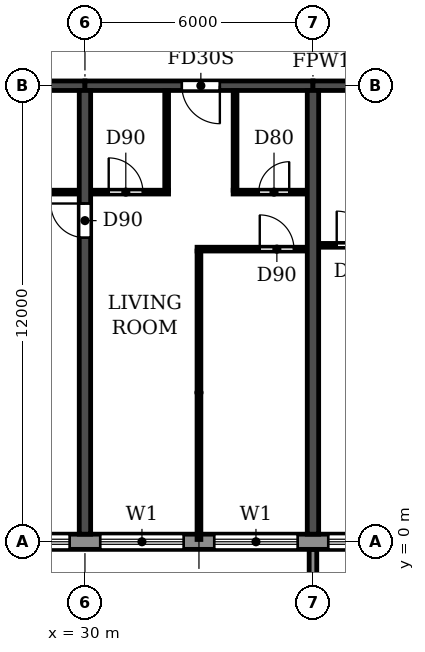
"""IFC4 building model, lengths in metres.
Left out: names, types, materials, properties, quantities, classifications, styles, units other than length and angle.
Written with IfcOpenShell. Run it as: python <this file> out.ifc"""

import sys

from ifc_helpers import new_model, si_unit, direction, frame, frame_2d, origin, place, context, subcontext, project, spatial, polyline, rectangle, outline, extrude, source, transform, mapped, element, fill, save


model = new_model("IFC4")
c1 = context("Model", 3, precision=1e-05, world=origin(), true_north=direction((0.0, 1.0)))
c2 = subcontext(c1, "Body", "Model", "MODEL_VIEW")
j1 = project(units=[si_unit("LENGTHUNIT", "METRE"), si_unit("PLANEANGLEUNIT", "RADIAN")], contexts=[c1])
p1 = place(None, origin())
s1 = spatial("IfcSite", under=j1, at=p1, CompositionType="ELEMENT")
p2 = place(p1, origin())
s2 = spatial("IfcBuilding", under=s1, at=p2, CompositionType="ELEMENT")
p3 = place(p2, frame((0.0, 0.0, 125.7)))
s3 = spatial("IfcBuildingStorey", under=s2, at=p3, CompositionType="ELEMENT", Elevation=125.7)
p4 = place(p3, frame((30.0, 0.2, 0.0), z_axis=(0.0, 0.0, 1.0), x_axis=(0.0, 1.0, 0.0)))
e1 = element("IfcWall", 1, at=p4, inside=s3, PredefinedType="SHEAR", context=c2, shape_type="SweptSolid", body=[
    extrude(rectangle(XDim=11.675, YDim=0.3, at=frame_2d((5.837, 0.0))), origin(), (0.0, 0.0, 1.0), 3.07),
])
p5 = place(p4, frame((7.8, 0.0, 0.0)))
e2 = element("IfcOpeningElement", 2, at=p5, cuts=e1, PredefinedType="OPENING", context=c2, shape_type="SweptSolid", body=[
    extrude(rectangle(XDim=0.9, YDim=2.1, at=frame_2d((0.45, 1.05))), frame((0.0, 0.16, 0.0), z_axis=(0.0, -1.0, 0.0), x_axis=(1.0, 0.0, 0.0)), (0.0, 0.0, 1.0), 0.32),
])
p6 = place(p3, frame((36.0, 0.2, 0.0), z_axis=(0.0, 0.0, 1.0), x_axis=(0.0, 1.0, 0.0)))
e3 = element("IfcWall", 3, at=p6, inside=s3, PredefinedType="SHEAR", context=c2, shape_type="SweptSolid", body=[
    extrude(rectangle(XDim=11.675, YDim=0.3, at=frame_2d((5.837, 0.0))), origin(), (0.0, 0.0, 1.0), 3.07),
])
p7 = place(p3, frame((24.0, 12.0, 0.0), z_axis=(0.0, 0.0, 1.0), x_axis=(1.0, 0.0, 0.0)))
e4 = element("IfcWall", 4, at=p7, inside=s3, PredefinedType="SHEAR", context=c2, shape_type="SweptSolid", body=[
    extrude(rectangle(XDim=6.0, YDim=0.25, at=frame_2d((3.0, 0.0))), origin(), (0.0, 0.0, 1.0), 2.47),
])
p8 = place(p3, frame((30.0, 12.0, 0.0), z_axis=(0.0, 0.0, 1.0), x_axis=(1.0, 0.0, 0.0)))
e5 = element("IfcWall", 5, at=p8, inside=s3, PredefinedType="SHEAR", context=c2, shape_type="SweptSolid", body=[
    extrude(rectangle(XDim=6.0, YDim=0.25, at=frame_2d((3.0, 0.0))), origin(), (0.0, 0.0, 1.0), 2.47),
])
p9 = place(p8, frame((2.55, 0.0, 0.0)))
e6 = element("IfcOpeningElement", 6, at=p9, cuts=e5, PredefinedType="OPENING", context=c2, shape_type="SweptSolid", body=[
    extrude(rectangle(XDim=1.0, YDim=2.1, at=frame_2d((0.5, 1.05))), frame((0.0, 0.135, 0.0), z_axis=(0.0, -1.0, 0.0), x_axis=(1.0, 0.0, 0.0)), (0.0, 0.0, 1.0), 0.27),
])
p10 = place(p3, frame((36.0, 12.0, 0.0), z_axis=(0.0, 0.0, 1.0), x_axis=(1.0, 0.0, 0.0)))
e7 = element("IfcWall", 7, at=p10, inside=s3, PredefinedType="SHEAR", context=c2, shape_type="SweptSolid", body=[
    extrude(rectangle(XDim=6.0, YDim=0.25, at=frame_2d((3.0, 0.0))), origin(), (0.0, 0.0, 1.0), 2.47),
])
p11 = place(p10, frame((2.55, 0.0, 0.0)))
e8 = element("IfcOpeningElement", 8, at=p11, cuts=e7, PredefinedType="OPENING", context=c2, shape_type="SweptSolid", body=[
    extrude(rectangle(XDim=1.0, YDim=2.1, at=frame_2d((0.5, 1.05))), frame((0.0, 0.135, 0.0), z_axis=(0.0, -1.0, 0.0), x_axis=(1.0, 0.0, 0.0)), (0.0, 0.0, 1.0), 0.27),
])
p12 = place(p3, frame((16.683, 0.0, 0.0), z_axis=(0.0, 0.0, 1.0), x_axis=(1.0, 0.0, 0.0)))
e9 = element("IfcWall", 9, at=p12, inside=s3, PredefinedType="STANDARD", context=c2, shape_type="SweptSolid", body=[
    extrude(rectangle(XDim=68.634, YDim=0.4, at=frame_2d((34.317, 0.0))), origin(), (0.0, 0.0, 1.0), 3.07),
])
p13 = place(p12, frame((1.717, 0.0, 0.9)))
e10 = element("IfcOpeningElement", 10, at=p13, cuts=e9, PredefinedType="OPENING", context=c2, shape_type="SweptSolid", body=[
    extrude(rectangle(XDim=2.2, YDim=1.5, at=frame_2d((1.1, 0.75))), frame((0.0, 0.21, 0.0), z_axis=(0.0, -1.0, 0.0), x_axis=(1.0, 0.0, 0.0)), (0.0, 0.0, 1.0), 0.42),
])
p14 = place(p12, frame((4.717, 0.0, 0.9)))
e11 = element("IfcOpeningElement", 11, at=p14, cuts=e9, PredefinedType="OPENING", context=c2, shape_type="SweptSolid", body=[
    extrude(rectangle(XDim=2.2, YDim=1.5, at=frame_2d((1.1, 0.75))), frame((0.0, 0.21, 0.0), z_axis=(0.0, -1.0, 0.0), x_axis=(1.0, 0.0, 0.0)), (0.0, 0.0, 1.0), 0.42),
])
p15 = place(p12, frame((7.717, 0.0, 0.9)))
e12 = element("IfcOpeningElement", 12, at=p15, cuts=e9, PredefinedType="OPENING", context=c2, shape_type="SweptSolid", body=[
    extrude(rectangle(XDim=2.2, YDim=1.5, at=frame_2d((1.1, 0.75))), frame((0.0, 0.21, 0.0), z_axis=(0.0, -1.0, 0.0), x_axis=(1.0, 0.0, 0.0)), (0.0, 0.0, 1.0), 0.42),
])
p16 = place(p12, frame((10.717, 0.0, 0.9)))
e13 = element("IfcOpeningElement", 13, at=p16, cuts=e9, PredefinedType="OPENING", context=c2, shape_type="SweptSolid", body=[
    extrude(rectangle(XDim=2.2, YDim=1.5, at=frame_2d((1.1, 0.75))), frame((0.0, 0.21, 0.0), z_axis=(0.0, -1.0, 0.0), x_axis=(1.0, 0.0, 0.0)), (0.0, 0.0, 1.0), 0.42),
])
p17 = place(p12, frame((13.717, 0.0, 0.9)))
e14 = element("IfcOpeningElement", 14, at=p17, cuts=e9, PredefinedType="OPENING", context=c2, shape_type="SweptSolid", body=[
    extrude(rectangle(XDim=2.2, YDim=1.5, at=frame_2d((1.1, 0.75))), frame((0.0, 0.21, 0.0), z_axis=(0.0, -1.0, 0.0), x_axis=(1.0, 0.0, 0.0)), (0.0, 0.0, 1.0), 0.42),
])
p18 = place(p12, frame((16.717, 0.0, 0.9)))
e15 = element("IfcOpeningElement", 15, at=p18, cuts=e9, PredefinedType="OPENING", context=c2, shape_type="SweptSolid", body=[
    extrude(rectangle(XDim=2.2, YDim=1.5, at=frame_2d((1.1, 0.75))), frame((0.0, 0.21, 0.0), z_axis=(0.0, -1.0, 0.0), x_axis=(1.0, 0.0, 0.0)), (0.0, 0.0, 1.0), 0.42),
])
p19 = place(p12, frame((19.717, 0.0, 0.9)))
e16 = element("IfcOpeningElement", 16, at=p19, cuts=e9, PredefinedType="OPENING", context=c2, shape_type="SweptSolid", body=[
    extrude(rectangle(XDim=2.2, YDim=1.5, at=frame_2d((1.1, 0.75))), frame((0.0, 0.21, 0.0), z_axis=(0.0, -1.0, 0.0), x_axis=(1.0, 0.0, 0.0)), (0.0, 0.0, 1.0), 0.42),
])
p20 = place(p12, frame((22.917, 0.0, 0.0)))
e17 = element("IfcOpeningElement", 17, at=p20, cuts=e9, PredefinedType="OPENING", context=c2, shape_type="SweptSolid", body=[
    extrude(rectangle(XDim=1.8, YDim=2.4, at=frame_2d((0.9, 1.2))), frame((0.0, 0.21, 0.0), z_axis=(0.0, -1.0, 0.0), x_axis=(1.0, 0.0, 0.0)), (0.0, 0.0, 1.0), 0.42),
])
p21 = place(p12, frame((25.717, 0.0, 0.9)))
e18 = element("IfcOpeningElement", 18, at=p21, cuts=e9, PredefinedType="OPENING", context=c2, shape_type="SweptSolid", body=[
    extrude(rectangle(XDim=2.2, YDim=1.5, at=frame_2d((1.1, 0.75))), frame((0.0, 0.21, 0.0), z_axis=(0.0, -1.0, 0.0), x_axis=(1.0, 0.0, 0.0)), (0.0, 0.0, 1.0), 0.42),
])
p22 = place(p12, frame((28.717, 0.0, 0.9)))
e19 = element("IfcOpeningElement", 19, at=p22, cuts=e9, PredefinedType="OPENING", context=c2, shape_type="SweptSolid", body=[
    extrude(rectangle(XDim=2.2, YDim=1.5, at=frame_2d((1.1, 0.75))), frame((0.0, 0.21, 0.0), z_axis=(0.0, -1.0, 0.0), x_axis=(1.0, 0.0, 0.0)), (0.0, 0.0, 1.0), 0.42),
])
p23 = place(p12, frame((31.717, 0.0, 0.9)))
e20 = element("IfcOpeningElement", 20, at=p23, cuts=e9, PredefinedType="OPENING", context=c2, shape_type="SweptSolid", body=[
    extrude(rectangle(XDim=2.2, YDim=1.5, at=frame_2d((1.1, 0.75))), frame((0.0, 0.21, 0.0), z_axis=(0.0, -1.0, 0.0), x_axis=(1.0, 0.0, 0.0)), (0.0, 0.0, 1.0), 0.42),
])
p24 = place(p12, frame((34.917, 0.0, 0.0)))
e21 = element("IfcOpeningElement", 21, at=p24, cuts=e9, PredefinedType="OPENING", context=c2, shape_type="SweptSolid", body=[
    extrude(rectangle(XDim=1.8, YDim=2.4, at=frame_2d((0.9, 1.2))), frame((0.0, 0.21, 0.0), z_axis=(0.0, -1.0, 0.0), x_axis=(1.0, 0.0, 0.0)), (0.0, 0.0, 1.0), 0.42),
])
p25 = place(p12, frame((37.717, 0.0, 0.9)))
e22 = element("IfcOpeningElement", 22, at=p25, cuts=e9, PredefinedType="OPENING", context=c2, shape_type="SweptSolid", body=[
    extrude(rectangle(XDim=2.2, YDim=1.5, at=frame_2d((1.1, 0.75))), frame((0.0, 0.21, 0.0), z_axis=(0.0, -1.0, 0.0), x_axis=(1.0, 0.0, 0.0)), (0.0, 0.0, 1.0), 0.42),
])
p26 = place(p12, frame((40.717, 0.0, 0.9)))
e23 = element("IfcOpeningElement", 23, at=p26, cuts=e9, PredefinedType="OPENING", context=c2, shape_type="SweptSolid", body=[
    extrude(rectangle(XDim=2.2, YDim=1.5, at=frame_2d((1.1, 0.75))), frame((0.0, 0.21, 0.0), z_axis=(0.0, -1.0, 0.0), x_axis=(1.0, 0.0, 0.0)), (0.0, 0.0, 1.0), 0.42),
])
p27 = place(p12, frame((43.717, 0.0, 0.9)))
e24 = element("IfcOpeningElement", 24, at=p27, cuts=e9, PredefinedType="OPENING", context=c2, shape_type="SweptSolid", body=[
    extrude(rectangle(XDim=2.2, YDim=1.5, at=frame_2d((1.1, 0.75))), frame((0.0, 0.21, 0.0), z_axis=(0.0, -1.0, 0.0), x_axis=(1.0, 0.0, 0.0)), (0.0, 0.0, 1.0), 0.42),
])
p28 = place(p12, frame((46.917, 0.0, 0.0)))
e25 = element("IfcOpeningElement", 25, at=p28, cuts=e9, PredefinedType="OPENING", context=c2, shape_type="SweptSolid", body=[
    extrude(rectangle(XDim=1.8, YDim=2.4, at=frame_2d((0.9, 1.2))), frame((0.0, 0.21, 0.0), z_axis=(0.0, -1.0, 0.0), x_axis=(1.0, 0.0, 0.0)), (0.0, 0.0, 1.0), 0.42),
])
p29 = place(p12, frame((49.717, 0.0, 0.9)))
e26 = element("IfcOpeningElement", 26, at=p29, cuts=e9, PredefinedType="OPENING", context=c2, shape_type="SweptSolid", body=[
    extrude(rectangle(XDim=2.2, YDim=1.5, at=frame_2d((1.1, 0.75))), frame((0.0, 0.21, 0.0), z_axis=(0.0, -1.0, 0.0), x_axis=(1.0, 0.0, 0.0)), (0.0, 0.0, 1.0), 0.42),
])
p30 = place(p12, frame((52.717, 0.0, 0.9)))
e27 = element("IfcOpeningElement", 27, at=p30, cuts=e9, PredefinedType="OPENING", context=c2, shape_type="SweptSolid", body=[
    extrude(rectangle(XDim=2.2, YDim=1.5, at=frame_2d((1.1, 0.75))), frame((0.0, 0.21, 0.0), z_axis=(0.0, -1.0, 0.0), x_axis=(1.0, 0.0, 0.0)), (0.0, 0.0, 1.0), 0.42),
])
p31 = place(p12, frame((55.717, 0.0, 0.9)))
e28 = element("IfcOpeningElement", 28, at=p31, cuts=e9, PredefinedType="OPENING", context=c2, shape_type="SweptSolid", body=[
    extrude(rectangle(XDim=2.2, YDim=1.5, at=frame_2d((1.1, 0.75))), frame((0.0, 0.21, 0.0), z_axis=(0.0, -1.0, 0.0), x_axis=(1.0, 0.0, 0.0)), (0.0, 0.0, 1.0), 0.42),
])
p32 = place(p12, frame((58.917, 0.0, 0.0)))
e29 = element("IfcOpeningElement", 29, at=p32, cuts=e9, PredefinedType="OPENING", context=c2, shape_type="SweptSolid", body=[
    extrude(rectangle(XDim=1.8, YDim=2.4, at=frame_2d((0.9, 1.2))), frame((0.0, 0.21, 0.0), z_axis=(0.0, -1.0, 0.0), x_axis=(1.0, 0.0, 0.0)), (0.0, 0.0, 1.0), 0.42),
])
p33 = place(p12, frame((61.717, 0.0, 0.9)))
e30 = element("IfcOpeningElement", 30, at=p33, cuts=e9, PredefinedType="OPENING", context=c2, shape_type="SweptSolid", body=[
    extrude(rectangle(XDim=2.2, YDim=1.5, at=frame_2d((1.1, 0.75))), frame((0.0, 0.21, 0.0), z_axis=(0.0, -1.0, 0.0), x_axis=(1.0, 0.0, 0.0)), (0.0, 0.0, 1.0), 0.42),
])
p34 = place(p12, frame((64.717, 0.0, 0.9)))
e31 = element("IfcOpeningElement", 31, at=p34, cuts=e9, PredefinedType="OPENING", context=c2, shape_type="SweptSolid", body=[
    extrude(rectangle(XDim=2.2, YDim=1.5, at=frame_2d((1.1, 0.75))), frame((0.0, 0.21, 0.0), z_axis=(0.0, -1.0, 0.0), x_axis=(1.0, 0.0, 0.0)), (0.0, 0.0, 1.0), 0.42),
])
m1 = source(origin(), c2, "Body", "SweptSolid", [
    extrude(outline(polyline([(0.0, 0.0), (0.2, 0.0), (0.2, 1.65), (0.0, 1.65), (0.0, 0.0)])), origin(), (0.0, 0.0, 1.0), 3.1),
])
p35 = place(p3, frame((35.9, -1.85, 0.0)))
e32 = element("IfcWall", 32, at=p35, inside=s3, PredefinedType="STANDARD", context=c2, shape_type="MappedRepresentation", body=[
    mapped(m1, transform((0.0, 0.0, 0.0))),
])
p36 = place(p3, frame((32.95, 7.7, 0.0), z_axis=(0.0, 0.0, 1.0), x_axis=(1.0, 0.0, 0.0)))
e33 = element("IfcWall", 33, at=p36, inside=s3, PredefinedType="PARTITIONING", context=c2, shape_type="SweptSolid", body=[
    extrude(rectangle(XDim=2.89, YDim=0.1, at=frame_2d((1.445, 0.0))), origin(), (0.0, 0.0, 1.0), 3.07),
])
p37 = place(p36, frame((1.65, 0.0, 0.0)))
e34 = element("IfcOpeningElement", 34, at=p37, cuts=e33, PredefinedType="OPENING", context=c2, shape_type="SweptSolid", body=[
    extrude(rectangle(XDim=0.9, YDim=2.1, at=frame_2d((0.45, 1.05))), frame((0.0, 0.06, 0.0), z_axis=(0.0, -1.0, 0.0), x_axis=(1.0, 0.0, 0.0)), (0.0, 0.0, 1.0), 0.12),
])
p38 = place(p3, frame((36.16, 7.8, 0.0), z_axis=(0.0, 0.0, 1.0), x_axis=(1.0, 0.0, 0.0)))
e35 = element("IfcWall", 35, at=p38, inside=s3, PredefinedType="PARTITIONING", context=c2, shape_type="SweptSolid", body=[
    extrude(rectangle(XDim=2.04, YDim=0.1, at=frame_2d((1.02, 0.0))), origin(), (0.0, 0.0, 1.0), 3.07),
])
p39 = place(p38, frame((0.465, 0.0, 0.0)))
e36 = element("IfcOpeningElement", 36, at=p39, cuts=e35, PredefinedType="OPENING", context=c2, shape_type="SweptSolid", body=[
    extrude(rectangle(XDim=0.9, YDim=2.1, at=frame_2d((0.45, 1.05))), frame((0.0, 0.06, 0.0), z_axis=(0.0, -1.0, 0.0), x_axis=(1.0, 0.0, 0.0)), (0.0, 0.0, 1.0), 0.12),
])
p40 = place(p3, frame((27.1, 9.2, 0.0), z_axis=(0.0, 0.0, 1.0), x_axis=(1.0, 0.0, 0.0)))
e37 = element("IfcWall", 37, at=p40, inside=s3, PredefinedType="PARTITIONING", context=c2, shape_type="SweptSolid", body=[
    extrude(rectangle(XDim=2.74, YDim=0.1, at=frame_2d((1.37, 0.0))), origin(), (0.0, 0.0, 1.0), 3.07),
])
p41 = place(p40, frame((1.0, 0.0, 0.0)))
e38 = element("IfcOpeningElement", 38, at=p41, cuts=e37, PredefinedType="OPENING", context=c2, shape_type="SweptSolid", body=[
    extrude(rectangle(XDim=0.8, YDim=2.1, at=frame_2d((0.4, 1.05))), frame((0.0, 0.06, 0.0), z_axis=(0.0, -1.0, 0.0), x_axis=(1.0, 0.0, 0.0)), (0.0, 0.0, 1.0), 0.12),
])
p42 = place(p3, frame((30.16, 9.2, 0.0), z_axis=(0.0, 0.0, 1.0), x_axis=(1.0, 0.0, 0.0)))
e39 = element("IfcWall", 39, at=p42, inside=s3, PredefinedType="PARTITIONING", context=c2, shape_type="SweptSolid", body=[
    extrude(rectangle(XDim=2.04, YDim=0.1, at=frame_2d((1.02, 0.0))), origin(), (0.0, 0.0, 1.0), 3.07),
])
p43 = place(p42, frame((0.465, 0.0, 0.0)))
e40 = element("IfcOpeningElement", 40, at=p43, cuts=e39, PredefinedType="OPENING", context=c2, shape_type="SweptSolid", body=[
    extrude(rectangle(XDim=0.9, YDim=2.1, at=frame_2d((0.45, 1.05))), frame((0.0, 0.06, 0.0), z_axis=(0.0, -1.0, 0.0), x_axis=(1.0, 0.0, 0.0)), (0.0, 0.0, 1.0), 0.12),
])
p44 = place(p3, frame((33.9, 9.2, 0.0), z_axis=(0.0, 0.0, 1.0), x_axis=(1.0, 0.0, 0.0)))
e41 = element("IfcWall", 41, at=p44, inside=s3, PredefinedType="PARTITIONING", context=c2, shape_type="SweptSolid", body=[
    extrude(rectangle(XDim=1.94, YDim=0.1, at=frame_2d((0.97, 0.0))), origin(), (0.0, 0.0, 1.0), 3.07),
])
p45 = place(p44, frame((0.675, 0.0, 0.0)))
e42 = element("IfcOpeningElement", 42, at=p45, cuts=e41, PredefinedType="OPENING", context=c2, shape_type="SweptSolid", body=[
    extrude(rectangle(XDim=0.8, YDim=2.1, at=frame_2d((0.4, 1.05))), frame((0.0, 0.06, 0.0), z_axis=(0.0, -1.0, 0.0), x_axis=(1.0, 0.0, 0.0)), (0.0, 0.0, 1.0), 0.12),
])
p46 = place(p3, frame((32.15, 9.25, 0.0), z_axis=(0.0, 0.0, 1.0), x_axis=(0.0, 1.0, 0.0)))
e43 = element("IfcWall", 43, at=p46, inside=s3, PredefinedType="PARTITIONING", context=c2, shape_type="SweptSolid", body=[
    extrude(rectangle(XDim=2.615, YDim=0.1, at=frame_2d((1.308, 0.0))), origin(), (0.0, 0.0, 1.0), 3.07),
])
p47 = place(p3, frame((33.0, 0.06, 0.0), z_axis=(0.0, 0.0, 1.0), x_axis=(0.0, 1.0, 0.0)))
e44 = element("IfcWall", 44, at=p47, inside=s3, PredefinedType="PARTITIONING", context=c2, shape_type="SweptSolid", body=[
    extrude(rectangle(XDim=7.59, YDim=0.1, at=frame_2d((3.795, 0.0))), origin(), (0.0, 0.0, 1.0), 3.07),
])
p48 = place(p3, frame((33.95, 9.25, 0.0), z_axis=(0.0, 0.0, 1.0), x_axis=(0.0, 1.0, 0.0)))
e45 = element("IfcWall", 45, at=p48, inside=s3, PredefinedType="PARTITIONING", context=c2, shape_type="SweptSolid", body=[
    extrude(rectangle(XDim=2.615, YDim=0.1, at=frame_2d((1.308, 0.0))), origin(), (0.0, 0.0, 1.0), 3.07),
])
p49 = place(p16, origin())
e46 = element("IfcWindow", 46, at=p49, inside=s3, PartitioningType="DOUBLE_PANEL_HORIZONTAL", PredefinedType="WINDOW", context=c2, shape_type="SweptSolid", body=[
    extrude(rectangle(XDim=2.2, YDim=1.5, at=frame_2d((1.1, 0.75))), frame((0.0, 0.03, 0.0), z_axis=(0.0, -1.0, 0.0), x_axis=(1.0, 0.0, 0.0)), (0.0, 0.0, 1.0), 0.06),
])
fill(e13, e46)
p50 = place(p17, origin())
e47 = element("IfcWindow", 47, at=p50, inside=s3, PartitioningType="DOUBLE_PANEL_HORIZONTAL", PredefinedType="WINDOW", context=c2, shape_type="SweptSolid", body=[
    extrude(rectangle(XDim=2.2, YDim=1.5, at=frame_2d((1.1, 0.75))), frame((0.0, 0.03, 0.0), z_axis=(0.0, -1.0, 0.0), x_axis=(1.0, 0.0, 0.0)), (0.0, 0.0, 1.0), 0.06),
])
fill(e14, e47)
p51 = place(p18, origin())
e48 = element("IfcWindow", 48, at=p51, inside=s3, PartitioningType="DOUBLE_PANEL_HORIZONTAL", PredefinedType="WINDOW", context=c2, shape_type="SweptSolid", body=[
    extrude(rectangle(XDim=2.2, YDim=1.5, at=frame_2d((1.1, 0.75))), frame((0.0, 0.03, 0.0), z_axis=(0.0, -1.0, 0.0), x_axis=(1.0, 0.0, 0.0)), (0.0, 0.0, 1.0), 0.06),
])
fill(e15, e48)
p52 = place(p19, origin())
e49 = element("IfcWindow", 49, at=p52, inside=s3, PartitioningType="DOUBLE_PANEL_HORIZONTAL", PredefinedType="WINDOW", context=c2, shape_type="SweptSolid", body=[
    extrude(rectangle(XDim=2.2, YDim=1.5, at=frame_2d((1.1, 0.75))), frame((0.0, 0.03, 0.0), z_axis=(0.0, -1.0, 0.0), x_axis=(1.0, 0.0, 0.0)), (0.0, 0.0, 1.0), 0.06),
])
fill(e16, e49)
p53 = place(p5, origin())
e50 = element("IfcDoor", 50, at=p53, inside=s3, OperationType="SINGLE_SWING_RIGHT", PredefinedType="DOOR", context=c2, shape_type="SweptSolid", body=[
    extrude(rectangle(XDim=0.9, YDim=2.1, at=frame_2d((0.45, 1.05))), frame((0.0, 0.025, 0.0), z_axis=(0.0, -1.0, 0.0), x_axis=(1.0, 0.0, 0.0)), (0.0, 0.0, 1.0), 0.05),
])
fill(e2, e50)
p54 = place(p43, origin())
e51 = element("IfcDoor", 51, at=p54, inside=s3, OperationType="SINGLE_SWING_LEFT", PredefinedType="DOOR", context=c2, shape_type="SweptSolid", body=[
    extrude(rectangle(XDim=0.9, YDim=2.1, at=frame_2d((0.45, 1.05))), frame((0.0, 0.025, 0.0), z_axis=(0.0, -1.0, 0.0), x_axis=(1.0, 0.0, 0.0)), (0.0, 0.0, 1.0), 0.05),
])
fill(e40, e51)
p55 = place(p9, frame((1.0, 0.0, 0.0), z_axis=(0.0, 0.0, 1.0), x_axis=(-1.0, 0.0, 0.0)))
e52 = element("IfcDoor", 52, at=p55, inside=s3, OperationType="SINGLE_SWING_LEFT", PredefinedType="DOOR", context=c2, shape_type="SweptSolid", body=[
    extrude(rectangle(XDim=1.0, YDim=2.1, at=frame_2d((0.5, 1.05))), frame((0.0, 0.025, 0.0), z_axis=(0.0, -1.0, 0.0), x_axis=(1.0, 0.0, 0.0)), (0.0, 0.0, 1.0), 0.05),
])
fill(e6, e52)
p56 = place(p45, origin())
e53 = element("IfcDoor", 53, at=p56, inside=s3, OperationType="SINGLE_SWING_RIGHT", PredefinedType="DOOR", context=c2, shape_type="SweptSolid", body=[
    extrude(rectangle(XDim=0.8, YDim=2.1, at=frame_2d((0.4, 1.05))), frame((0.0, 0.025, 0.0), z_axis=(0.0, -1.0, 0.0), x_axis=(1.0, 0.0, 0.0)), (0.0, 0.0, 1.0), 0.05),
])
fill(e42, e53)
p57 = place(p37, origin())
e54 = element("IfcDoor", 54, at=p57, inside=s3, OperationType="SINGLE_SWING_LEFT", PredefinedType="DOOR", context=c2, shape_type="SweptSolid", body=[
    extrude(rectangle(XDim=0.9, YDim=2.1, at=frame_2d((0.45, 1.05))), frame((0.0, 0.025, 0.0), z_axis=(0.0, -1.0, 0.0), x_axis=(1.0, 0.0, 0.0)), (0.0, 0.0, 1.0), 0.05),
])
fill(e34, e54)
p58 = place(p39, origin())
e55 = element("IfcDoor", 55, at=p58, inside=s3, OperationType="SINGLE_SWING_LEFT", PredefinedType="DOOR", context=c2, shape_type="SweptSolid", body=[
    extrude(rectangle(XDim=0.9, YDim=2.1, at=frame_2d((0.45, 1.05))), frame((0.0, 0.025, 0.0), z_axis=(0.0, -1.0, 0.0), x_axis=(1.0, 0.0, 0.0)), (0.0, 0.0, 1.0), 0.05),
])
fill(e36, e55)
save(model, sys.argv[1])
